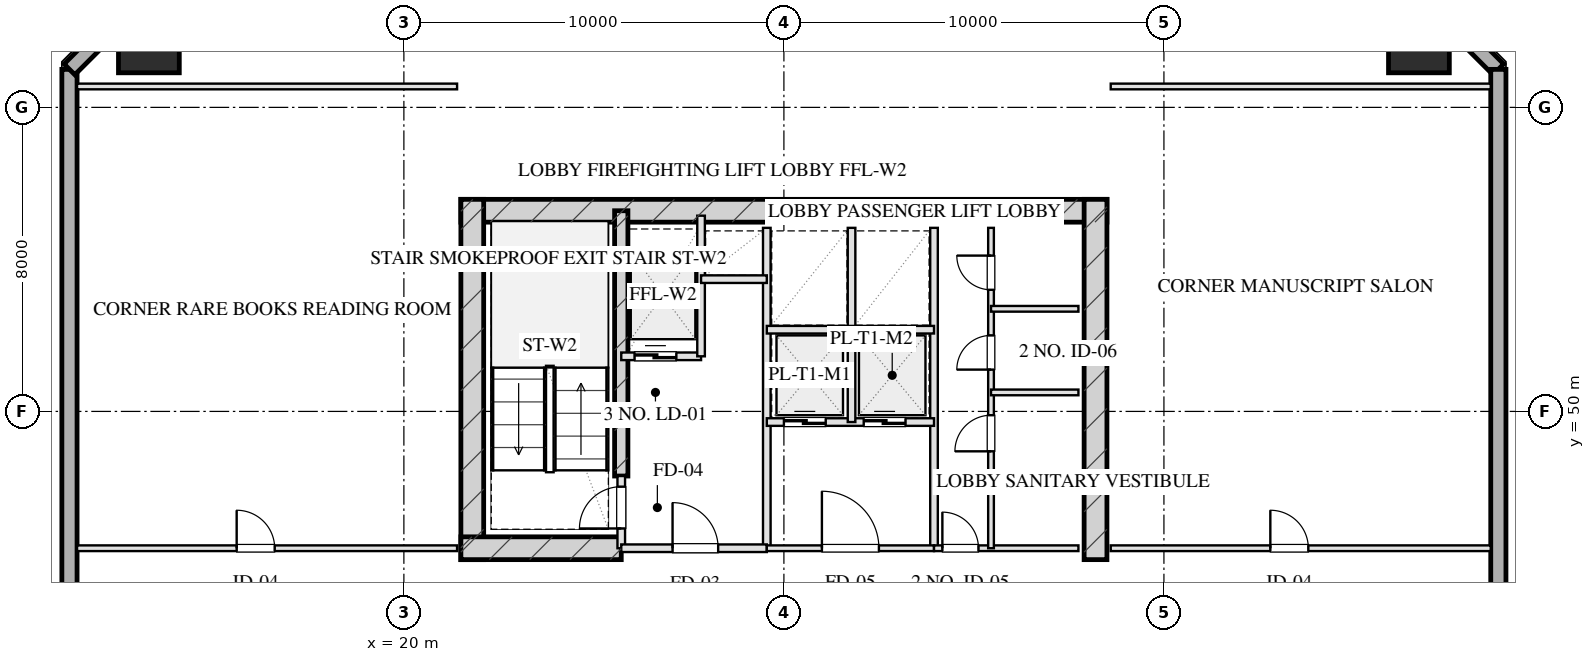
"""IFC4 building model, lengths in metres.
Left out: names, types, materials, properties, quantities, classifications, styles, units other than length and angle.
Written with IfcOpenShell. Run it as: python <this file> out.ifc"""

import sys

from ifc_helpers import new_model, si_unit, direction, frame, frame_2d, origin, origin_2d, place, context, subcontext, project, spatial, rectangle, hollow_rectangle, extrude, element, fill, save


model = new_model("IFC4")
c1 = context("Model", 3, precision=1e-05, world=origin(), true_north=direction((0.0, 1.0)))
c2 = subcontext(c1, "Body", "Model", "MODEL_VIEW")
j1 = project(units=[si_unit("LENGTHUNIT", "METRE"), si_unit("PLANEANGLEUNIT", "RADIAN")], contexts=[c1])
p1 = place(None, origin())
s1 = spatial("IfcSite", under=j1, at=p1, CompositionType="ELEMENT")
p2 = place(p1, origin())
s2 = spatial("IfcBuilding", under=s1, at=p2, CompositionType="ELEMENT")
p3 = place(p2, frame((0.0, 0.0, 103.5)))
s3 = spatial("IfcBuildingStorey", under=s2, at=p3, CompositionType="ELEMENT", Elevation=103.5)
p4 = place(p3, frame((21.5, 55.28, 0.0), z_axis=(0.0, 0.0, 1.0), x_axis=(1.0, 0.0, 0.0)))
e1 = element("IfcWall", 1, at=p4, inside=s3, PredefinedType="SHEAR", context=c2, shape_type="SweptSolid", body=[
    extrude(rectangle(XDim=17.0, YDim=0.6, at=frame_2d((8.5, 0.0))), origin(), (0.0, 0.0, 1.0), 3.45),
])
for number, where, z_axis, x_axis in (
    (2, (21.8, 46.1, 0.0), (0.0, 0.0, 1.0), (0.0, 1.0, 0.0)),
    (3, (38.2, 46.1, 0.0), (0.0, 0.0, 1.0), (0.0, 1.0, 0.0)),
):
    element("IfcWall", number, at=place(p3, frame(where, z_axis=z_axis, x_axis=x_axis)), inside=s3, PredefinedType="SHEAR", context=c2, shape_type="SweptSolid", body=[
        extrude(rectangle(XDim=9.48, YDim=0.6, at=frame_2d((4.74, 0.0))), origin(), (0.0, 0.0, 1.0), 3.45),
    ])
p5 = place(p3, frame((25.72, 48.3, 0.0), z_axis=(0.0, 0.0, 1.0), x_axis=(0.0, 1.0, 0.0)))
e4 = element("IfcWall", 4, at=p5, inside=s3, PredefinedType="SHEAR", context=c2, shape_type="SweptSolid", body=[
    extrude(rectangle(XDim=6.98, YDim=0.35, at=frame_2d((3.49, 0.0))), origin(), (0.0, 0.0, 1.0), 3.45),
])
p6 = place(p3, frame((21.5, 46.4, 0.0), z_axis=(0.0, 0.0, 1.0), x_axis=(1.0, 0.0, 0.0)))
e5 = element("IfcWall", 5, at=p6, inside=s3, PredefinedType="SHEAR", context=c2, shape_type="SweptSolid", body=[
    extrude(rectangle(XDim=4.22, YDim=0.6, at=frame_2d((2.11, 0.0))), origin(), (0.0, 0.0, 1.0), 3.45),
])
for number, where, z_axis, x_axis in (
    (6, (46.71, 59.71, 0.0), (0.0, 0.0, 1.0), (1.0, 0.0, 0.0)),
    (7, (13.29, 59.71, 0.0), (0.0, 0.0, 1.0), (1.0, 0.0, 0.0)),
):
    element("IfcColumn", number, at=place(p3, frame(where, z_axis=z_axis, x_axis=x_axis)), inside=s3, PredefinedType="COLUMN", context=c2, shape_type="SweptSolid", body=[
        extrude(hollow_rectangle(XDim=1.6, YDim=1.6, WallThickness=0.055, at=origin_2d()), origin(), (0.0, 0.0, 1.0), 3.451),
    ])
p7 = place(p3, frame((11.2, 9.0, 0.0), z_axis=(0.0, 0.0, 1.0), x_axis=(0.0, 1.0, 0.0)))
e8 = element("IfcWall", 8, at=p7, inside=s3, PredefinedType="SOLIDWALL", context=c2, shape_type="SweptSolid", body=[
    extrude(rectangle(XDim=50.0, YDim=0.4, at=frame_2d((25.0, 0.0))), origin(), (0.0, 0.0, 1.0), 2.61),
])
p8 = place(p7, frame((26.4, 0.0, 0.75)))
e9 = element("IfcOpeningElement", 9, at=p8, cuts=e8, PredefinedType="OPENING", context=c2, shape_type="SweptSolid", body=[
    extrude(rectangle(XDim=2.4, YDim=1.46, at=frame_2d((1.2, 0.73))), frame((0.0, 0.21, 0.0), z_axis=(0.0, -1.0, 0.0), x_axis=(1.0, 0.0, 0.0)), (0.0, 0.0, 1.0), 0.42),
])
p9 = place(p7, frame((21.35, 0.0, 0.0)))
e10 = element("IfcOpeningElement", 10, at=p9, cuts=e8, PredefinedType="OPENING", context=c2, shape_type="SweptSolid", body=[
    extrude(rectangle(XDim=1.1, YDim=2.15, at=frame_2d((0.55, 1.075))), frame((0.0, 0.21, 0.0), z_axis=(0.0, -1.0, 0.0), x_axis=(1.0, 0.0, 0.0)), (0.0, 0.0, 1.0), 0.42),
])
for number, where, z_axis, x_axis in (
    (11, (11.2, 59.0, 0.0), (0.0, 0.0, 1.0), (0.707, 0.707, 0.0)),
    (12, (46.0, 61.8, 0.0), (0.0, 0.0, 1.0), (0.707, -0.707, 0.0)),
):
    element("IfcWall", number, at=place(p3, frame(where, z_axis=z_axis, x_axis=x_axis)), inside=s3, PredefinedType="SOLIDWALL", context=c2, shape_type="SweptSolid", body=[
        extrude(rectangle(XDim=3.96, YDim=0.4, at=frame_2d((1.98, 0.0))), origin(), (0.0, 0.0, 1.0), 2.61),
    ])
p10 = place(p3, frame((48.8, 59.0, 0.0), z_axis=(0.0, 0.0, 1.0), x_axis=(0.0, -1.0, 0.0)))
e13 = element("IfcWall", 13, at=p10, inside=s3, PredefinedType="SOLIDWALL", context=c2, shape_type="SweptSolid", body=[
    extrude(rectangle(XDim=50.0, YDim=0.4, at=frame_2d((25.0, 0.0))), origin(), (0.0, 0.0, 1.0), 2.61),
])
p11 = place(p10, frame((27.55, 0.0, 0.0)))
e14 = element("IfcOpeningElement", 14, at=p11, cuts=e13, PredefinedType="OPENING", context=c2, shape_type="SweptSolid", body=[
    extrude(rectangle(XDim=1.1, YDim=2.15, at=frame_2d((0.55, 1.075))), frame((0.0, 0.21, 0.0), z_axis=(0.0, -1.0, 0.0), x_axis=(1.0, 0.0, 0.0)), (0.0, 0.0, 1.0), 0.42),
])
p12 = place(p3, frame((25.72, 46.4, 0.0), z_axis=(0.0, 0.0, 1.0), x_axis=(0.0, 1.0, 0.0)))
e15 = element("IfcWall", 15, at=p12, inside=s3, PredefinedType="PARTITIONING", context=c2, shape_type="SweptSolid", body=[
    extrude(rectangle(XDim=1.9, YDim=0.2, at=frame_2d((0.95, 0.0))), origin(), (0.0, 0.0, 1.0), 3.175),
])
p13 = place(p12, frame((0.52, 0.0, 0.0)))
e16 = element("IfcOpeningElement", 16, at=p13, cuts=e15, PredefinedType="OPENING", context=c2, shape_type="SweptSolid", body=[
    extrude(rectangle(XDim=1.1, YDim=2.05, at=frame_2d((0.55, 1.025))), frame((0.0, 0.11, 0.0), z_axis=(0.0, -1.0, 0.0), x_axis=(1.0, 0.0, 0.0)), (0.0, 0.0, 1.0), 0.22),
])
p14 = place(p3, frame((29.55, 46.4, 0.0), z_axis=(0.0, 0.0, 1.0), x_axis=(0.0, 1.0, 0.0)))
e17 = element("IfcWall", 17, at=p14, inside=s3, PredefinedType="PARTITIONING", context=c2, shape_type="SweptSolid", body=[
    extrude(rectangle(XDim=8.43, YDim=0.2, at=frame_2d((4.215, 0.0))), origin(), (0.0, 0.0, 1.0), 3.175),
])
p15 = place(p3, frame((25.72, 46.4, 0.0), z_axis=(0.0, 0.0, 1.0), x_axis=(1.0, 0.0, 0.0)))
e18 = element("IfcWall", 18, at=p15, inside=s3, PredefinedType="PARTITIONING", context=c2, shape_type="SweptSolid", body=[
    extrude(rectangle(XDim=3.83, YDim=0.2, at=frame_2d((1.915, 0.0))), origin(), (0.0, 0.0, 1.0), 3.175),
])
p16 = place(p15, frame((1.35, 0.0, 0.0)))
e19 = element("IfcOpeningElement", 19, at=p16, cuts=e18, PredefinedType="OPENING", context=c2, shape_type="SweptSolid", body=[
    extrude(rectangle(XDim=1.2, YDim=2.05, at=frame_2d((0.6, 1.025))), frame((0.0, 0.11, 0.0), z_axis=(0.0, -1.0, 0.0), x_axis=(1.0, 0.0, 0.0)), (0.0, 0.0, 1.0), 0.22),
])
p17 = place(p3, frame((25.72, 51.45, 0.0), z_axis=(0.0, 0.0, 1.0), x_axis=(1.0, 0.0, 0.0)))
e20 = element("IfcWall", 20, at=p17, inside=s3, PredefinedType="PARTITIONING", context=c2, shape_type="SweptSolid", body=[
    extrude(rectangle(XDim=2.1, YDim=0.2, at=frame_2d((1.05, 0.0))), origin(), (0.0, 0.0, 1.0), 3.175),
])
p18 = place(p17, frame((0.35, 0.0, 0.0)))
e21 = element("IfcOpeningElement", 21, at=p18, cuts=e20, PredefinedType="OPENING", context=c2, shape_type="SweptSolid", body=[
    extrude(rectangle(XDim=1.1, YDim=2.05, at=frame_2d((0.55, 1.025))), frame((0.0, 0.11, 0.0), z_axis=(0.0, -1.0, 0.0), x_axis=(1.0, 0.0, 0.0)), (0.0, 0.0, 1.0), 0.22),
])
p19 = place(p3, frame((27.82, 51.45, 0.0), z_axis=(0.0, 0.0, 1.0), x_axis=(0.0, 1.0, 0.0)))
e22 = element("IfcWall", 22, at=p19, inside=s3, PredefinedType="PARTITIONING", context=c2, shape_type="SweptSolid", body=[
    extrude(rectangle(XDim=3.7, YDim=0.2, at=frame_2d((1.85, 0.0))), origin(), (0.0, 0.0, 1.0), 3.175),
])
p20 = place(p3, frame((27.82, 53.48, 0.0), z_axis=(0.0, 0.0, 1.0), x_axis=(1.0, 0.0, 0.0)))
e23 = element("IfcWall", 23, at=p20, inside=s3, PredefinedType="PARTITIONING", context=c2, shape_type="SweptSolid", body=[
    extrude(rectangle(XDim=1.73, YDim=0.2, at=frame_2d((0.865, 0.0))), origin(), (0.0, 0.0, 1.0), 3.175),
])
p21 = place(p3, frame((33.95, 46.4, 0.0), z_axis=(0.0, 0.0, 1.0), x_axis=(0.0, 1.0, 0.0)))
e24 = element("IfcWall", 24, at=p21, inside=s3, PredefinedType="PARTITIONING", context=c2, shape_type="SweptSolid", body=[
    extrude(rectangle(XDim=8.43, YDim=0.2, at=frame_2d((4.215, 0.0))), origin(), (0.0, 0.0, 1.0), 3.175),
])
p22 = place(p3, frame((29.55, 46.4, 0.0), z_axis=(0.0, 0.0, 1.0), x_axis=(1.0, 0.0, 0.0)))
e25 = element("IfcWall", 25, at=p22, inside=s3, PredefinedType="PARTITIONING", context=c2, shape_type="SweptSolid", body=[
    extrude(rectangle(XDim=4.4, YDim=0.15, at=frame_2d((2.2, 0.0))), origin(), (0.0, 0.0, 1.0), 3.175),
])
p23 = place(p22, frame((1.45, 0.0, 0.0)))
e26 = element("IfcOpeningElement", 26, at=p23, cuts=e25, PredefinedType="OPENING", context=c2, shape_type="SweptSolid", body=[
    extrude(rectangle(XDim=1.5, YDim=2.05, at=frame_2d((0.75, 1.025))), frame((0.0, 0.085, 0.0), z_axis=(0.0, -1.0, 0.0), x_axis=(1.0, 0.0, 0.0)), (0.0, 0.0, 1.0), 0.17),
])
p24 = place(p3, frame((29.55, 49.72, 0.0), z_axis=(0.0, 0.0, 1.0), x_axis=(1.0, 0.0, 0.0)))
e27 = element("IfcWall", 27, at=p24, inside=s3, PredefinedType="PARTITIONING", context=c2, shape_type="SweptSolid", body=[
    extrude(rectangle(XDim=4.4, YDim=0.2, at=frame_2d((2.2, 0.0))), origin(), (0.0, 0.0, 1.0), 3.175),
])
p25 = place(p24, frame((0.45, 0.0, 0.0)))
e28 = element("IfcOpeningElement", 28, at=p25, cuts=e27, PredefinedType="OPENING", context=c2, shape_type="SweptSolid", body=[
    extrude(rectangle(XDim=1.1, YDim=2.05, at=frame_2d((0.55, 1.025))), frame((0.0, 0.11, 0.0), z_axis=(0.0, -1.0, 0.0), x_axis=(1.0, 0.0, 0.0)), (0.0, 0.0, 1.0), 0.22),
])
p26 = place(p24, frame((2.55, 0.0, 0.0)))
e29 = element("IfcOpeningElement", 29, at=p26, cuts=e27, PredefinedType="OPENING", context=c2, shape_type="SweptSolid", body=[
    extrude(rectangle(XDim=1.1, YDim=2.05, at=frame_2d((0.55, 1.025))), frame((0.0, 0.11, 0.0), z_axis=(0.0, -1.0, 0.0), x_axis=(1.0, 0.0, 0.0)), (0.0, 0.0, 1.0), 0.22),
])
p27 = place(p3, frame((31.78, 49.72, 0.0), z_axis=(0.0, 0.0, 1.0), x_axis=(0.0, 1.0, 0.0)))
e30 = element("IfcWall", 30, at=p27, inside=s3, PredefinedType="PARTITIONING", context=c2, shape_type="SweptSolid", body=[
    extrude(rectangle(XDim=5.11, YDim=0.2, at=frame_2d((2.555, 0.0))), origin(), (0.0, 0.0, 1.0), 3.175),
])
p28 = place(p3, frame((29.55, 52.15, 0.0), z_axis=(0.0, 0.0, 1.0), x_axis=(1.0, 0.0, 0.0)))
e31 = element("IfcWall", 31, at=p28, inside=s3, PredefinedType="PARTITIONING", context=c2, shape_type="SweptSolid", body=[
    extrude(rectangle(XDim=4.4, YDim=0.2, at=frame_2d((2.2, 0.0))), origin(), (0.0, 0.0, 1.0), 3.175),
])
p29 = place(p3, frame((33.95, 46.4, 0.0), z_axis=(0.0, 0.0, 1.0), x_axis=(1.0, 0.0, 0.0)))
e32 = element("IfcWall", 32, at=p29, inside=s3, PredefinedType="PARTITIONING", context=c2, shape_type="SweptSolid", body=[
    extrude(rectangle(XDim=3.8, YDim=0.15, at=frame_2d((1.9, 0.0))), origin(), (0.0, 0.0, 1.0), 3.175),
])
p30 = place(p29, frame((0.22, 0.0, 0.0)))
e33 = element("IfcOpeningElement", 33, at=p30, cuts=e32, PredefinedType="OPENING", context=c2, shape_type="SweptSolid", body=[
    extrude(rectangle(XDim=0.95, YDim=2.05, at=frame_2d((0.475, 1.025))), frame((0.0, 0.085, 0.0), z_axis=(0.0, -1.0, 0.0), x_axis=(1.0, 0.0, 0.0)), (0.0, 0.0, 1.0), 0.17),
])
p31 = place(p3, frame((35.45, 46.4, 0.0), z_axis=(0.0, 0.0, 1.0), x_axis=(0.0, 1.0, 0.0)))
e34 = element("IfcWall", 34, at=p31, inside=s3, PredefinedType="PARTITIONING", context=c2, shape_type="SweptSolid", body=[
    extrude(rectangle(XDim=8.43, YDim=0.15, at=frame_2d((4.215, 0.0))), origin(), (0.0, 0.0, 1.0), 2.765),
])
p32 = place(p31, frame((2.55, 0.0, 0.0)))
e35 = element("IfcOpeningElement", 35, at=p32, cuts=e34, PredefinedType="OPENING", context=c2, shape_type="SweptSolid", body=[
    extrude(rectangle(XDim=0.95, YDim=2.05, at=frame_2d((0.475, 1.025))), frame((0.0, 0.085, 0.0), z_axis=(0.0, -1.0, 0.0), x_axis=(1.0, 0.0, 0.0)), (0.0, 0.0, 1.0), 0.17),
])
p33 = place(p31, frame((4.7, 0.0, 0.0)))
e36 = element("IfcOpeningElement", 36, at=p33, cuts=e34, PredefinedType="OPENING", context=c2, shape_type="SweptSolid", body=[
    extrude(rectangle(XDim=0.9, YDim=2.05, at=frame_2d((0.45, 1.025))), frame((0.0, 0.085, 0.0), z_axis=(0.0, -1.0, 0.0), x_axis=(1.0, 0.0, 0.0)), (0.0, 0.0, 1.0), 0.17),
])
p34 = place(p31, frame((6.8, 0.0, 0.0)))
e37 = element("IfcOpeningElement", 37, at=p34, cuts=e34, PredefinedType="OPENING", context=c2, shape_type="SweptSolid", body=[
    extrude(rectangle(XDim=0.9, YDim=2.05, at=frame_2d((0.45, 1.025))), frame((0.0, 0.085, 0.0), z_axis=(0.0, -1.0, 0.0), x_axis=(1.0, 0.0, 0.0)), (0.0, 0.0, 1.0), 0.17),
])
for number, where, z_axis, x_axis in (
    (38, (35.45, 50.5, 0.0), (0.0, 0.0, 1.0), (1.0, 0.0, 0.0)),
    (39, (35.45, 52.7, 0.0), (0.0, 0.0, 1.0), (1.0, 0.0, 0.0)),
):
    element("IfcWall", number, at=place(p3, frame(where, z_axis=z_axis, x_axis=x_axis)), inside=s3, PredefinedType="PARTITIONING", context=c2, shape_type="SweptSolid", body=[
        extrude(rectangle(XDim=2.3, YDim=0.15, at=frame_2d((1.15, 0.0))), origin(), (0.0, 0.0, 1.0), 3.175),
    ])
p35 = place(p3, frame((11.4, 58.55, 0.0), z_axis=(0.0, 0.0, 1.0), x_axis=(1.0, 0.0, 0.0)))
e40 = element("IfcWall", 40, at=p35, inside=s3, PredefinedType="PARTITIONING", context=c2, shape_type="SweptSolid", body=[
    extrude(rectangle(XDim=10.0, YDim=0.15, at=frame_2d((5.0, 0.0))), origin(), (0.0, 0.0, 1.0), 3.175),
])
p36 = place(p3, frame((11.4, 46.4, 0.0), z_axis=(0.0, 0.0, 1.0), x_axis=(1.0, 0.0, 0.0)))
e41 = element("IfcWall", 41, at=p36, inside=s3, PredefinedType="PARTITIONING", context=c2, shape_type="SweptSolid", body=[
    extrude(rectangle(XDim=10.0, YDim=0.15, at=frame_2d((5.0, 0.0))), origin(), (0.0, 0.0, 1.0), 3.175),
])
p37 = place(p36, frame((4.2, 0.0, 0.0)))
e42 = element("IfcOpeningElement", 42, at=p37, cuts=e41, PredefinedType="OPENING", context=c2, shape_type="SweptSolid", body=[
    extrude(rectangle(XDim=1.0, YDim=2.05, at=frame_2d((0.5, 1.025))), frame((0.0, 0.085, 0.0), z_axis=(0.0, -1.0, 0.0), x_axis=(1.0, 0.0, 0.0)), (0.0, 0.0, 1.0), 0.17),
])
p38 = place(p3, frame((38.6, 58.55, 0.0), z_axis=(0.0, 0.0, 1.0), x_axis=(1.0, 0.0, 0.0)))
e43 = element("IfcWall", 43, at=p38, inside=s3, PredefinedType="PARTITIONING", context=c2, shape_type="SweptSolid", body=[
    extrude(rectangle(XDim=10.0, YDim=0.15, at=frame_2d((5.0, 0.0))), origin(), (0.0, 0.0, 1.0), 3.175),
])
p39 = place(p3, frame((38.6, 46.4, 0.0), z_axis=(0.0, 0.0, 1.0), x_axis=(1.0, 0.0, 0.0)))
e44 = element("IfcWall", 44, at=p39, inside=s3, PredefinedType="PARTITIONING", context=c2, shape_type="SweptSolid", body=[
    extrude(rectangle(XDim=10.0, YDim=0.15, at=frame_2d((5.0, 0.0))), origin(), (0.0, 0.0, 1.0), 3.175),
])
p40 = place(p39, frame((4.2, 0.0, 0.0)))
e45 = element("IfcOpeningElement", 45, at=p40, cuts=e44, PredefinedType="OPENING", context=c2, shape_type="SweptSolid", body=[
    extrude(rectangle(XDim=1.0, YDim=2.05, at=frame_2d((0.5, 1.025))), frame((0.0, 0.085, 0.0), z_axis=(0.0, -1.0, 0.0), x_axis=(1.0, 0.0, 0.0)), (0.0, 0.0, 1.0), 0.17),
])
p41 = place(p13, origin())
e46 = element("IfcDoor", 46, at=p41, inside=s3, OperationType="SINGLE_SWING_LEFT", PredefinedType="DOOR", context=c2, shape_type="SweptSolid", body=[
    extrude(rectangle(XDim=1.1, YDim=2.05, at=frame_2d((0.55, 1.025))), frame((0.0, 0.025, 0.0), z_axis=(0.0, -1.0, 0.0), x_axis=(1.0, 0.0, 0.0)), (0.0, 0.0, 1.0), 0.05),
])
fill(e16, e46)
p42 = place(p16, origin())
e47 = element("IfcDoor", 47, at=p42, inside=s3, OperationType="SINGLE_SWING_LEFT", PredefinedType="DOOR", context=c2, shape_type="SweptSolid", body=[
    extrude(rectangle(XDim=1.2, YDim=2.05, at=frame_2d((0.6, 1.025))), frame((0.0, 0.025, 0.0), z_axis=(0.0, -1.0, 0.0), x_axis=(1.0, 0.0, 0.0)), (0.0, 0.0, 1.0), 0.05),
])
fill(e19, e47)
p43 = place(p18, origin())
e48 = element("IfcDoor", 48, at=p43, inside=s3, OperationType="DOUBLE_DOOR_SLIDING", PredefinedType="DOOR", context=c2, shape_type="SweptSolid", body=[
    extrude(rectangle(XDim=1.1, YDim=2.05, at=frame_2d((0.55, 1.025))), frame((0.0, 0.025, 0.0), z_axis=(0.0, -1.0, 0.0), x_axis=(1.0, 0.0, 0.0)), (0.0, 0.0, 1.0), 0.05),
])
fill(e21, e48)
p44 = place(p23, origin())
e49 = element("IfcDoor", 49, at=p44, inside=s3, OperationType="SINGLE_SWING_LEFT", PredefinedType="DOOR", context=c2, shape_type="SweptSolid", body=[
    extrude(rectangle(XDim=1.5, YDim=2.05, at=frame_2d((0.75, 1.025))), frame((0.0, 0.025, 0.0), z_axis=(0.0, -1.0, 0.0), x_axis=(1.0, 0.0, 0.0)), (0.0, 0.0, 1.0), 0.05),
])
fill(e26, e49)
p45 = place(p25, origin())
e50 = element("IfcDoor", 50, at=p45, inside=s3, OperationType="DOUBLE_DOOR_SLIDING", PredefinedType="DOOR", context=c2, shape_type="SweptSolid", body=[
    extrude(rectangle(XDim=1.1, YDim=2.05, at=frame_2d((0.55, 1.025))), frame((0.0, 0.025, 0.0), z_axis=(0.0, -1.0, 0.0), x_axis=(1.0, 0.0, 0.0)), (0.0, 0.0, 1.0), 0.05),
])
fill(e28, e50)
p46 = place(p26, origin())
e51 = element("IfcDoor", 51, at=p46, inside=s3, OperationType="DOUBLE_DOOR_SLIDING", PredefinedType="DOOR", context=c2, shape_type="SweptSolid", body=[
    extrude(rectangle(XDim=1.1, YDim=2.05, at=frame_2d((0.55, 1.025))), frame((0.0, 0.025, 0.0), z_axis=(0.0, -1.0, 0.0), x_axis=(1.0, 0.0, 0.0)), (0.0, 0.0, 1.0), 0.05),
])
fill(e29, e51)
p47 = place(p30, origin())
e52 = element("IfcDoor", 52, at=p47, inside=s3, OperationType="SINGLE_SWING_LEFT", PredefinedType="DOOR", context=c2, shape_type="SweptSolid", body=[
    extrude(rectangle(XDim=0.95, YDim=2.05, at=frame_2d((0.475, 1.025))), frame((0.0, 0.025, 0.0), z_axis=(0.0, -1.0, 0.0), x_axis=(1.0, 0.0, 0.0)), (0.0, 0.0, 1.0), 0.05),
])
fill(e33, e52)
p48 = place(p32, origin())
e53 = element("IfcDoor", 53, at=p48, inside=s3, OperationType="SINGLE_SWING_LEFT", PredefinedType="DOOR", context=c2, shape_type="SweptSolid", body=[
    extrude(rectangle(XDim=0.95, YDim=2.05, at=frame_2d((0.475, 1.025))), frame((0.0, 0.025, 0.0), z_axis=(0.0, -1.0, 0.0), x_axis=(1.0, 0.0, 0.0)), (0.0, 0.0, 1.0), 0.05),
])
fill(e35, e53)
p49 = place(p33, origin())
e54 = element("IfcDoor", 54, at=p49, inside=s3, OperationType="SINGLE_SWING_LEFT", PredefinedType="DOOR", context=c2, shape_type="SweptSolid", body=[
    extrude(rectangle(XDim=0.9, YDim=2.05, at=frame_2d((0.45, 1.025))), frame((0.0, 0.025, 0.0), z_axis=(0.0, -1.0, 0.0), x_axis=(1.0, 0.0, 0.0)), (0.0, 0.0, 1.0), 0.05),
])
fill(e36, e54)
p50 = place(p34, origin())
e55 = element("IfcDoor", 55, at=p50, inside=s3, OperationType="SINGLE_SWING_RIGHT", PredefinedType="DOOR", context=c2, shape_type="SweptSolid", body=[
    extrude(rectangle(XDim=0.9, YDim=2.05, at=frame_2d((0.45, 1.025))), frame((0.0, 0.025, 0.0), z_axis=(0.0, -1.0, 0.0), x_axis=(1.0, 0.0, 0.0)), (0.0, 0.0, 1.0), 0.05),
])
fill(e37, e55)
p51 = place(p37, origin())
e56 = element("IfcDoor", 56, at=p51, inside=s3, OperationType="SINGLE_SWING_LEFT", PredefinedType="DOOR", context=c2, shape_type="SweptSolid", body=[
    extrude(rectangle(XDim=1.0, YDim=2.05, at=frame_2d((0.5, 1.025))), frame((0.0, 0.025, 0.0), z_axis=(0.0, -1.0, 0.0), x_axis=(1.0, 0.0, 0.0)), (0.0, 0.0, 1.0), 0.05),
])
fill(e42, e56)
p52 = place(p40, origin())
e57 = element("IfcDoor", 57, at=p52, inside=s3, OperationType="SINGLE_SWING_LEFT", PredefinedType="DOOR", context=c2, shape_type="SweptSolid", body=[
    extrude(rectangle(XDim=1.0, YDim=2.05, at=frame_2d((0.5, 1.025))), frame((0.0, 0.025, 0.0), z_axis=(0.0, -1.0, 0.0), x_axis=(1.0, 0.0, 0.0)), (0.0, 0.0, 1.0), 0.05),
])
fill(e45, e57)
save(model, sys.argv[1])
